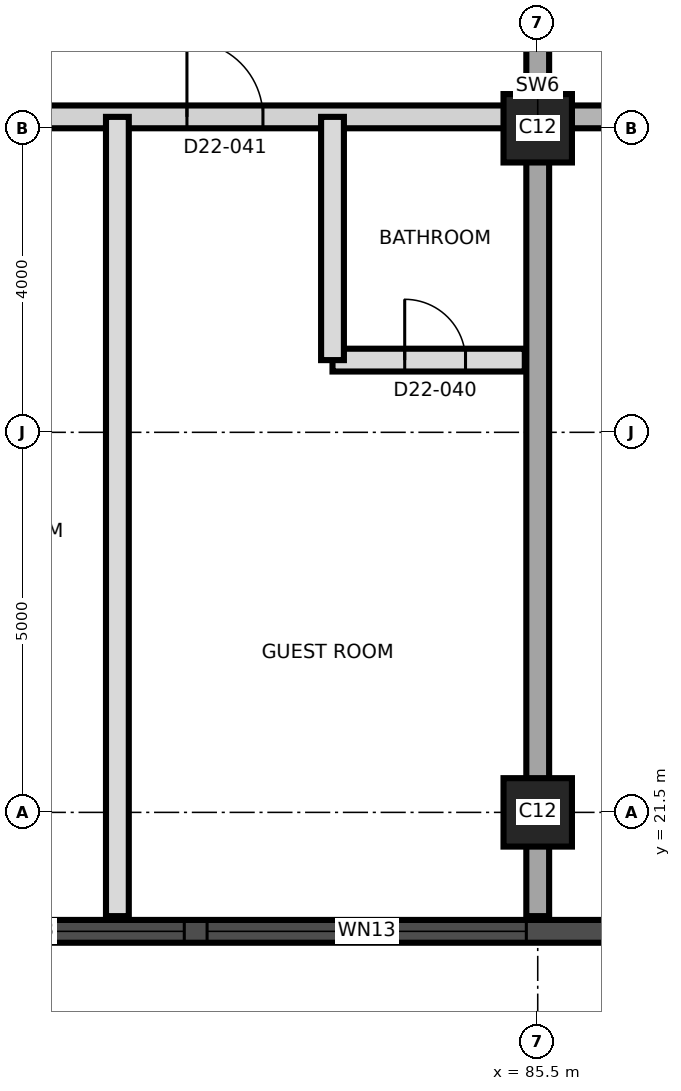
"""IFC4 building model, lengths in metres.
Left out: names, types, materials, properties, quantities, classifications, styles, units other than length and angle.
Written with IfcOpenShell. Run it as: python <this file> out.ifc"""

import sys

from ifc_helpers import new_model, si_unit, direction, frame, frame_2d, origin, origin_2d, place, context, subcontext, project, spatial, rectangle, extrude, element, fill, save


model = new_model("IFC4")
c1 = context("Model", 3, precision=1e-05, world=origin(), true_north=direction((0.0, 1.0)))
c2 = subcontext(c1, "Body", "Model", "MODEL_VIEW")
j1 = project(units=[si_unit("LENGTHUNIT", "METRE"), si_unit("PLANEANGLEUNIT", "RADIAN")], contexts=[c1])
p1 = place(None, origin())
s1 = spatial("IfcSite", under=j1, at=p1, CompositionType="ELEMENT")
p2 = place(p1, origin())
s2 = spatial("IfcBuilding", under=s1, at=p2, CompositionType="ELEMENT")
p3 = place(p2, frame((0.0, 0.0, 203.2)))
s3 = spatial("IfcBuildingStorey", under=s2, at=p3, CompositionType="ELEMENT", Elevation=203.2)
for number, where, z_axis, x_axis in (
    (1, (85.5, 21.5, 0.0), (0.0, 0.0, 1.0), (1.0, 0.0, 0.0)),
    (2, (85.5, 30.5, 0.0), (0.0, 0.0, 1.0), (1.0, 0.0, 0.0)),
):
    element("IfcColumn", number, at=place(p3, frame(where, z_axis=z_axis, x_axis=x_axis)), inside=s3, PredefinedType="COLUMN", context=c2, shape_type="SweptSolid", body=[
        extrude(rectangle(XDim=0.9, YDim=0.9, at=origin_2d()), origin(), (0.0, 0.0, 1.0), 3.7),
    ])
p4 = place(p3, frame((85.5, 20.135, 0.0), z_axis=(0.0, 0.0, 1.0), x_axis=(0.0, 1.0, 0.0)))
e3 = element("IfcWall", 3, at=p4, inside=s3, PredefinedType="SHEAR", context=c2, shape_type="SweptSolid", body=[
    extrude(rectangle(XDim=20.73, YDim=0.3, at=frame_2d((10.365, 0.0))), origin(), (0.0, 0.0, 1.0), 3.7),
])
p5 = place(p4, frame((11.565, 0.0, 0.0)))
e4 = element("IfcOpeningElement", 4, at=p5, cuts=e3, PredefinedType="OPENING", context=c2, shape_type="SweptSolid", body=[
    extrude(rectangle(XDim=1.4, YDim=2.1, at=frame_2d((0.7, 1.05))), frame((0.0, 0.16, 0.0), z_axis=(0.0, -1.0, 0.0), x_axis=(1.0, 0.0, 0.0)), (0.0, 0.0, 1.0), 0.32),
])
p6 = place(p3, frame((44.01, 19.935, 0.0), z_axis=(0.0, 0.0, 1.0), x_axis=(1.0, 0.0, 0.0)))
e5 = element("IfcWall", 5, at=p6, inside=s3, PredefinedType="SOLIDWALL", context=c2, shape_type="SweptSolid", body=[
    extrude(rectangle(XDim=43.477, YDim=0.3, at=frame_2d((21.738, 0.0))), origin(), (0.0, 0.0, 1.0), 3.4),
])
p7 = place(p6, frame((1.845, 0.0, 0.3)))
e6 = element("IfcOpeningElement", 6, at=p7, cuts=e5, PredefinedType="OPENING", context=c2, shape_type="SweptSolid", body=[
    extrude(rectangle(XDim=1.8, YDim=2.4, at=frame_2d((0.9, 1.2))), frame((0.0, 0.16, 0.0), z_axis=(0.0, -1.0, 0.0), x_axis=(1.0, 0.0, 0.0)), (0.0, 0.0, 1.0), 0.32),
])
p8 = place(p6, frame((5.64, 0.0, 0.9)))
e7 = element("IfcOpeningElement", 7, at=p8, cuts=e5, PredefinedType="OPENING", context=c2, shape_type="SweptSolid", body=[
    extrude(rectangle(XDim=4.2, YDim=1.7, at=frame_2d((2.1, 0.85))), frame((0.0, 0.16, 0.0), z_axis=(0.0, -1.0, 0.0), x_axis=(1.0, 0.0, 0.0)), (0.0, 0.0, 1.0), 0.32),
])
p9 = place(p6, frame((10.14, 0.0, 0.9)))
e8 = element("IfcOpeningElement", 8, at=p9, cuts=e5, PredefinedType="OPENING", context=c2, shape_type="SweptSolid", body=[
    extrude(rectangle(XDim=4.2, YDim=1.7, at=frame_2d((2.1, 0.85))), frame((0.0, 0.16, 0.0), z_axis=(0.0, -1.0, 0.0), x_axis=(1.0, 0.0, 0.0)), (0.0, 0.0, 1.0), 0.32),
])
p10 = place(p6, frame((14.64, 0.0, 0.9)))
e9 = element("IfcOpeningElement", 9, at=p10, cuts=e5, PredefinedType="OPENING", context=c2, shape_type="SweptSolid", body=[
    extrude(rectangle(XDim=4.2, YDim=1.7, at=frame_2d((2.1, 0.85))), frame((0.0, 0.16, 0.0), z_axis=(0.0, -1.0, 0.0), x_axis=(1.0, 0.0, 0.0)), (0.0, 0.0, 1.0), 0.32),
])
p11 = place(p6, frame((19.14, 0.0, 0.9)))
e10 = element("IfcOpeningElement", 10, at=p11, cuts=e5, PredefinedType="OPENING", context=c2, shape_type="SweptSolid", body=[
    extrude(rectangle(XDim=4.2, YDim=1.7, at=frame_2d((2.1, 0.85))), frame((0.0, 0.16, 0.0), z_axis=(0.0, -1.0, 0.0), x_axis=(1.0, 0.0, 0.0)), (0.0, 0.0, 1.0), 0.32),
])
p12 = place(p6, frame((23.64, 0.0, 0.9)))
e11 = element("IfcOpeningElement", 11, at=p12, cuts=e5, PredefinedType="OPENING", context=c2, shape_type="SweptSolid", body=[
    extrude(rectangle(XDim=4.2, YDim=1.7, at=frame_2d((2.1, 0.85))), frame((0.0, 0.16, 0.0), z_axis=(0.0, -1.0, 0.0), x_axis=(1.0, 0.0, 0.0)), (0.0, 0.0, 1.0), 0.32),
])
p13 = place(p6, frame((28.14, 0.0, 0.9)))
e12 = element("IfcOpeningElement", 12, at=p13, cuts=e5, PredefinedType="OPENING", context=c2, shape_type="SweptSolid", body=[
    extrude(rectangle(XDim=4.2, YDim=1.7, at=frame_2d((2.1, 0.85))), frame((0.0, 0.16, 0.0), z_axis=(0.0, -1.0, 0.0), x_axis=(1.0, 0.0, 0.0)), (0.0, 0.0, 1.0), 0.32),
])
p14 = place(p6, frame((32.64, 0.0, 0.9)))
e13 = element("IfcOpeningElement", 13, at=p14, cuts=e5, PredefinedType="OPENING", context=c2, shape_type="SweptSolid", body=[
    extrude(rectangle(XDim=4.2, YDim=1.7, at=frame_2d((2.1, 0.85))), frame((0.0, 0.16, 0.0), z_axis=(0.0, -1.0, 0.0), x_axis=(1.0, 0.0, 0.0)), (0.0, 0.0, 1.0), 0.32),
])
p15 = place(p6, frame((37.14, 0.0, 0.9)))
e14 = element("IfcOpeningElement", 14, at=p15, cuts=e5, PredefinedType="OPENING", context=c2, shape_type="SweptSolid", body=[
    extrude(rectangle(XDim=4.2, YDim=1.7, at=frame_2d((2.1, 0.85))), frame((0.0, 0.16, 0.0), z_axis=(0.0, -1.0, 0.0), x_axis=(1.0, 0.0, 0.0)), (0.0, 0.0, 1.0), 0.32),
])
p16 = place(p3, frame((82.8, 27.45, 0.0), z_axis=(0.0, 0.0, 1.0), x_axis=(1.0, 0.0, 0.0)))
e15 = element("IfcWall", 15, at=p16, inside=s3, PredefinedType="PARTITIONING", context=c2, shape_type="SweptSolid", body=[
    extrude(rectangle(XDim=2.53, YDim=0.3, at=frame_2d((1.265, 0.0))), origin(), (0.0, 0.0, 1.0), 3.4),
])
p17 = place(p16, frame((0.95, 0.0, 0.0)))
e16 = element("IfcOpeningElement", 16, at=p17, cuts=e15, PredefinedType="OPENING", context=c2, shape_type="SweptSolid", body=[
    extrude(rectangle(XDim=0.8, YDim=2.1, at=frame_2d((0.4, 1.05))), frame((0.0, 0.16, 0.0), z_axis=(0.0, -1.0, 0.0), x_axis=(1.0, 0.0, 0.0)), (0.0, 0.0, 1.0), 0.32),
])
p18 = place(p3, frame((58.55, 30.65, 0.0), z_axis=(0.0, 0.0, 1.0), x_axis=(1.0, 0.0, 0.0)))
e17 = element("IfcWall", 17, at=p18, inside=s3, PredefinedType="PARTITIONING", context=c2, shape_type="SweptSolid", body=[
    extrude(rectangle(XDim=26.78, YDim=0.3, at=frame_2d((13.39, 0.0))), origin(), (0.0, 0.0, 1.0), 3.4),
])
p19 = place(p18, frame((1.65, 0.0, 0.0)))
e18 = element("IfcOpeningElement", 18, at=p19, cuts=e17, PredefinedType="OPENING", context=c2, shape_type="SweptSolid", body=[
    extrude(rectangle(XDim=1.2, YDim=2.1, at=frame_2d((0.6, 1.05))), frame((0.0, 0.16, 0.0), z_axis=(0.0, -1.0, 0.0), x_axis=(1.0, 0.0, 0.0)), (0.0, 0.0, 1.0), 0.32),
])
p20 = place(p18, frame((4.9, 0.0, 0.0)))
e19 = element("IfcOpeningElement", 19, at=p20, cuts=e17, PredefinedType="OPENING", context=c2, shape_type="SweptSolid", body=[
    extrude(rectangle(XDim=1.0, YDim=2.1, at=frame_2d((0.5, 1.05))), frame((0.0, 0.16, 0.0), z_axis=(0.0, -1.0, 0.0), x_axis=(1.0, 0.0, 0.0)), (0.0, 0.0, 1.0), 0.32),
])
p21 = place(p18, frame((10.085, 0.0, 0.0)))
e20 = element("IfcOpeningElement", 20, at=p21, cuts=e17, PredefinedType="OPENING", context=c2, shape_type="SweptSolid", body=[
    extrude(rectangle(XDim=1.2, YDim=2.1, at=frame_2d((0.6, 1.05))), frame((0.0, 0.16, 0.0), z_axis=(0.0, -1.0, 0.0), x_axis=(1.0, 0.0, 0.0)), (0.0, 0.0, 1.0), 0.32),
])
p22 = place(p18, frame((13.335, 0.0, 0.0)))
e21 = element("IfcOpeningElement", 21, at=p22, cuts=e17, PredefinedType="OPENING", context=c2, shape_type="SweptSolid", body=[
    extrude(rectangle(XDim=1.0, YDim=2.1, at=frame_2d((0.5, 1.05))), frame((0.0, 0.16, 0.0), z_axis=(0.0, -1.0, 0.0), x_axis=(1.0, 0.0, 0.0)), (0.0, 0.0, 1.0), 0.32),
])
p23 = place(p18, frame((19.085, 0.0, 0.0)))
e22 = element("IfcOpeningElement", 22, at=p23, cuts=e17, PredefinedType="OPENING", context=c2, shape_type="SweptSolid", body=[
    extrude(rectangle(XDim=1.2, YDim=2.1, at=frame_2d((0.6, 1.05))), frame((0.0, 0.16, 0.0), z_axis=(0.0, -1.0, 0.0), x_axis=(1.0, 0.0, 0.0)), (0.0, 0.0, 1.0), 0.32),
])
p24 = place(p18, frame((22.335, 0.0, 0.0)))
e23 = element("IfcOpeningElement", 23, at=p24, cuts=e17, PredefinedType="OPENING", context=c2, shape_type="SweptSolid", body=[
    extrude(rectangle(XDim=1.0, YDim=2.1, at=frame_2d((0.5, 1.05))), frame((0.0, 0.16, 0.0), z_axis=(0.0, -1.0, 0.0), x_axis=(1.0, 0.0, 0.0)), (0.0, 0.0, 1.0), 0.32),
])
p25 = place(p3, frame((85.67, 30.65, 0.0), z_axis=(0.0, 0.0, 1.0), x_axis=(1.0, 0.0, 0.0)))
e24 = element("IfcWall", 24, at=p25, inside=s3, PredefinedType="SHEAR", context=c2, shape_type="SweptSolid", body=[
    extrude(rectangle(XDim=9.58, YDim=0.3, at=frame_2d((4.79, 0.0))), origin(), (0.0, 0.0, 1.0), 3.4),
])
p26 = place(p25, frame((2.08, 0.0, 0.0)))
e25 = element("IfcOpeningElement", 25, at=p26, cuts=e24, PredefinedType="OPENING", context=c2, shape_type="SweptSolid", body=[
    extrude(rectangle(XDim=1.2, YDim=2.1, at=frame_2d((0.6, 1.05))), frame((0.0, 0.16, 0.0), z_axis=(0.0, -1.0, 0.0), x_axis=(1.0, 0.0, 0.0)), (0.0, 0.0, 1.0), 0.32),
])
p27 = place(p25, frame((5.63, 0.0, 0.0)))
e26 = element("IfcOpeningElement", 26, at=p27, cuts=e24, PredefinedType="OPENING", context=c2, shape_type="SweptSolid", body=[
    extrude(rectangle(XDim=1.0, YDim=2.1, at=frame_2d((0.5, 1.05))), frame((0.0, 0.16, 0.0), z_axis=(0.0, -1.0, 0.0), x_axis=(1.0, 0.0, 0.0)), (0.0, 0.0, 1.0), 0.32),
])
p28 = place(p3, frame((79.97, 20.135, 0.0), z_axis=(0.0, 0.0, 1.0), x_axis=(0.0, 1.0, 0.0)))
e27 = element("IfcWall", 27, at=p28, inside=s3, PredefinedType="PARTITIONING", context=c2, shape_type="SweptSolid", body=[
    extrude(rectangle(XDim=10.515, YDim=0.3, at=frame_2d((5.257, 0.0))), origin(), (0.0, 0.0, 1.0), 3.35),
])
p29 = place(p3, frame((82.8, 27.45, 0.0), z_axis=(0.0, 0.0, 1.0), x_axis=(0.0, 1.0, 0.0)))
e28 = element("IfcWall", 28, at=p29, inside=s3, PredefinedType="PARTITIONING", context=c2, shape_type="SweptSolid", body=[
    extrude(rectangle(XDim=3.2, YDim=0.3, at=frame_2d((1.6, 0.0))), origin(), (0.0, 0.0, 1.0), 3.4),
])
p30 = place(p14, origin())
e29 = element("IfcWindow", 29, at=p30, inside=s3, PartitioningType="SINGLE_PANEL", PredefinedType="WINDOW", context=c2, shape_type="SweptSolid", body=[
    extrude(rectangle(XDim=4.2, YDim=1.7, at=frame_2d((2.1, 0.85))), frame((0.0, 0.03, 0.0), z_axis=(0.0, -1.0, 0.0), x_axis=(1.0, 0.0, 0.0)), (0.0, 0.0, 1.0), 0.06),
])
fill(e13, e29)
p31 = place(p15, origin())
e30 = element("IfcWindow", 30, at=p31, inside=s3, PartitioningType="SINGLE_PANEL", PredefinedType="WINDOW", context=c2, shape_type="SweptSolid", body=[
    extrude(rectangle(XDim=4.2, YDim=1.7, at=frame_2d((2.1, 0.85))), frame((0.0, 0.03, 0.0), z_axis=(0.0, -1.0, 0.0), x_axis=(1.0, 0.0, 0.0)), (0.0, 0.0, 1.0), 0.06),
])
fill(e14, e30)
p32 = place(p17, origin())
e31 = element("IfcDoor", 31, at=p32, inside=s3, OperationType="SINGLE_SWING_LEFT", PredefinedType="DOOR", context=c2, shape_type="SweptSolid", body=[
    extrude(rectangle(XDim=0.8, YDim=2.1, at=frame_2d((0.4, 1.05))), frame((0.0, 0.025, 0.0), z_axis=(0.0, -1.0, 0.0), x_axis=(1.0, 0.0, 0.0)), (0.0, 0.0, 1.0), 0.05),
])
fill(e16, e31)
p33 = place(p24, origin())
e32 = element("IfcDoor", 32, at=p33, inside=s3, OperationType="SINGLE_SWING_RIGHT", PredefinedType="DOOR", context=c2, shape_type="SweptSolid", body=[
    extrude(rectangle(XDim=1.0, YDim=2.1, at=frame_2d((0.5, 1.05))), frame((0.0, 0.025, 0.0), z_axis=(0.0, -1.0, 0.0), x_axis=(1.0, 0.0, 0.0)), (0.0, 0.0, 1.0), 0.05),
])
fill(e23, e32)
save(model, sys.argv[1])
